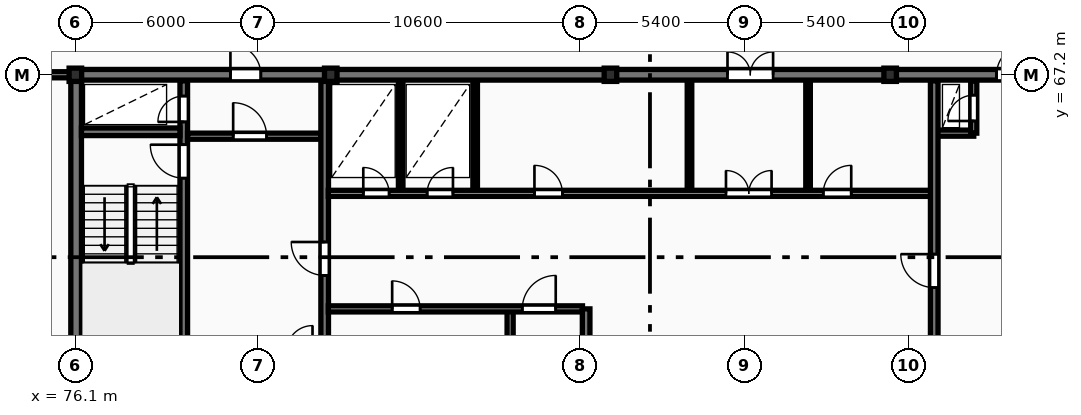
"""IFC4 building model, lengths in metres.
Left out: names, types, materials, properties, quantities, classifications, styles, units other than length and angle.
Written with IfcOpenShell. Run it as: python <this file> out.ifc"""

import sys

from ifc_helpers import new_model, si_unit, direction, frame, frame_2d, origin, origin_2d, place, context, subcontext, project, spatial, rectangle, i_section, extrude, element, fill, save


model = new_model("IFC4")
c1 = context("Model", 3, precision=1e-05, world=origin(), true_north=direction((0.0, 1.0)))
c2 = subcontext(c1, "Body", "Model", "MODEL_VIEW")
j1 = project(units=[si_unit("LENGTHUNIT", "METRE"), si_unit("PLANEANGLEUNIT", "RADIAN")], contexts=[c1])
p1 = place(None, origin())
s1 = spatial("IfcSite", under=j1, at=p1, CompositionType="ELEMENT")
p2 = place(p1, origin())
s2 = spatial("IfcBuilding", under=s1, at=p2, CompositionType="ELEMENT")
p3 = place(p2, frame((0.0, 0.0, 146.5)))
s3 = spatial("IfcBuildingStorey", under=s2, at=p3, CompositionType="ELEMENT", Elevation=146.5)
for number, where, z_axis, x_axis in (
    (1, (76.1, 67.2, 0.0), (0.0, 0.0, 1.0), (1.0, 0.0, 0.0)),
    (2, (84.5, 67.2, 0.0), (0.0, 0.0, 1.0), (1.0, 0.0, 0.0)),
    (3, (93.7, 67.2, 0.0), (0.0, 0.0, 1.0), (1.0, 0.0, 0.0)),
    (4, (102.9, 67.2, 0.0), (0.0, 0.0, 1.0), (1.0, 0.0, 0.0)),
):
    element("IfcColumn", number, at=place(p3, frame(where, z_axis=z_axis, x_axis=x_axis)), inside=s3, PredefinedType="COLUMN", context=c2, shape_type="SweptSolid", body=[
        extrude(i_section(OverallWidth=0.412, OverallDepth=0.437, WebThickness=0.036, FlangeThickness=0.052, FilletRadius=0.015, at=origin_2d()), origin(), (0.0, 0.0, 1.0), 3.6),
    ])
p4 = place(p3, frame((76.125, 55.375, 0.0), z_axis=(0.0, 0.0, 1.0), x_axis=(0.0, 1.0, 0.0)))
e5 = element("IfcWall", 5, at=p4, inside=s3, PredefinedType="SHEAR", context=c2, shape_type="SweptSolid", body=[
    extrude(rectangle(XDim=11.65, YDim=0.35, at=frame_2d((5.825, 0.0))), origin(), (0.0, 0.0, 1.0), 3.6),
])
p5 = place(p3, frame((75.95, 67.2, 0.0), z_axis=(0.0, 0.0, 1.0), x_axis=(1.0, 0.0, 0.0)))
e6 = element("IfcWall", 6, at=p5, inside=s3, PredefinedType="SHEAR", context=c2, shape_type="SweptSolid", body=[
    extrude(rectangle(XDim=36.3, YDim=0.35, at=frame_2d((18.15, 0.0))), origin(), (0.0, 0.0, 1.0), 3.6),
])
p6 = place(p5, frame((5.25, 0.0, 0.0)))
e7 = element("IfcOpeningElement", 7, at=p6, cuts=e6, PredefinedType="OPENING", context=c2, shape_type="SweptSolid", body=[
    extrude(rectangle(XDim=1.0, YDim=2.15, at=frame_2d((0.5, 1.075))), frame((0.0, 0.185, 0.0), z_axis=(0.0, -1.0, 0.0), x_axis=(1.0, 0.0, 0.0)), (0.0, 0.0, 1.0), 0.37),
])
p7 = place(p5, frame((21.6, 0.0, 0.0)))
e8 = element("IfcOpeningElement", 8, at=p7, cuts=e6, PredefinedType="OPENING", context=c2, shape_type="SweptSolid", body=[
    extrude(rectangle(XDim=1.5, YDim=2.2, at=frame_2d((0.75, 1.1))), frame((0.0, 0.185, 0.0), z_axis=(0.0, -1.0, 0.0), x_axis=(1.0, 0.0, 0.0)), (0.0, 0.0, 1.0), 0.37),
])
p8 = place(p5, frame((30.45, 0.0, 0.0)))
e9 = element("IfcOpeningElement", 9, at=p8, cuts=e6, PredefinedType="OPENING", context=c2, shape_type="SweptSolid", body=[
    extrude(rectangle(XDim=1.0, YDim=2.15, at=frame_2d((0.5, 1.075))), frame((0.0, 0.185, 0.0), z_axis=(0.0, -1.0, 0.0), x_axis=(1.0, 0.0, 0.0)), (0.0, 0.0, 1.0), 0.37),
])
p9 = place(p3, frame((79.665, 55.4, 0.0), z_axis=(0.0, 0.0, 1.0), x_axis=(0.0, 1.0, 0.0)))
e10 = element("IfcWall", 10, at=p9, inside=s3, PredefinedType="SHEAR", context=c2, shape_type="SweptSolid", body=[
    extrude(rectangle(XDim=11.6, YDim=0.25, at=frame_2d((5.8, 0.0))), origin(), (0.0, 0.0, 1.0), 3.6),
])
p10 = place(p9, frame((0.55, 0.0, 0.0)))
e11 = element("IfcOpeningElement", 11, at=p10, cuts=e10, PredefinedType="OPENING", context=c2, shape_type="SweptSolid", body=[
    extrude(rectangle(XDim=0.85, YDim=2.05, at=frame_2d((0.425, 1.025))), frame((0.0, 0.135, 0.0), z_axis=(0.0, -1.0, 0.0), x_axis=(1.0, 0.0, 0.0)), (0.0, 0.0, 1.0), 0.27),
])
p11 = place(p9, frame((8.4, 0.0, 0.0)))
e12 = element("IfcOpeningElement", 12, at=p11, cuts=e10, PredefinedType="OPENING", context=c2, shape_type="SweptSolid", body=[
    extrude(rectangle(XDim=1.1, YDim=2.1, at=frame_2d((0.55, 1.05))), frame((0.0, 0.135, 0.0), z_axis=(0.0, -1.0, 0.0), x_axis=(1.0, 0.0, 0.0)), (0.0, 0.0, 1.0), 0.27),
])
p12 = place(p9, frame((10.25, 0.0, 0.0)))
e13 = element("IfcOpeningElement", 13, at=p12, cuts=e10, PredefinedType="OPENING", context=c2, shape_type="SweptSolid", body=[
    extrude(rectangle(XDim=0.85, YDim=2.05, at=frame_2d((0.425, 1.025))), frame((0.0, 0.135, 0.0), z_axis=(0.0, -1.0, 0.0), x_axis=(1.0, 0.0, 0.0)), (0.0, 0.0, 1.0), 0.27),
])
p13 = place(p3, frame((76.3, 65.325, 0.0), z_axis=(0.0, 0.0, 1.0), x_axis=(1.0, 0.0, 0.0)))
e14 = element("IfcWall", 14, at=p13, inside=s3, PredefinedType="SHEAR", context=c2, shape_type="SweptSolid", body=[
    extrude(rectangle(XDim=3.24, YDim=0.25, at=frame_2d((1.62, 0.0))), origin(), (0.0, 0.0, 1.0), 3.6),
])
p14 = place(p3, frame((79.79, 65.18, 0.0), z_axis=(0.0, 0.0, 1.0), x_axis=(1.0, 0.0, 0.0)))
e15 = element("IfcWall", 15, at=p14, inside=s3, PredefinedType="PARTITIONING", context=c2, shape_type="SweptSolid", body=[
    extrude(rectangle(XDim=4.39, YDim=0.2, at=frame_2d((2.195, 0.0))), origin(), (0.0, 0.0, 1.0), 3.31),
])
p15 = place(p14, frame((1.5, 0.0, 0.0)))
e16 = element("IfcOpeningElement", 16, at=p15, cuts=e15, PredefinedType="OPENING", context=c2, shape_type="SweptSolid", body=[
    extrude(rectangle(XDim=1.1, YDim=2.1, at=frame_2d((0.55, 1.05))), frame((0.0, 0.11, 0.0), z_axis=(0.0, -1.0, 0.0), x_axis=(1.0, 0.0, 0.0)), (0.0, 0.0, 1.0), 0.22),
])
p16 = place(p3, frame((84.3, 55.4, 0.0), z_axis=(0.0, 0.0, 1.0), x_axis=(0.0, 1.0, 0.0)))
e17 = element("IfcWall", 17, at=p16, inside=s3, PredefinedType="SHEAR", context=c2, shape_type="SweptSolid", body=[
    extrude(rectangle(XDim=11.6, YDim=0.25, at=frame_2d((5.8, 0.0))), origin(), (0.0, 0.0, 1.0), 3.6),
])
p17 = place(p16, frame((5.2, 0.0, 0.0)))
e18 = element("IfcOpeningElement", 18, at=p17, cuts=e17, PredefinedType="OPENING", context=c2, shape_type="SweptSolid", body=[
    extrude(rectangle(XDim=1.1, YDim=2.1, at=frame_2d((0.55, 1.05))), frame((0.0, 0.135, 0.0), z_axis=(0.0, -1.0, 0.0), x_axis=(1.0, 0.0, 0.0)), (0.0, 0.0, 1.0), 0.27),
])
p18 = place(p3, frame((90.4, 55.4, 0.0), z_axis=(0.0, 0.0, 1.0), x_axis=(0.0, 1.0, 0.0)))
e19 = element("IfcWall", 19, at=p18, inside=s3, PredefinedType="PARTITIONING", context=c2, shape_type="SweptSolid", body=[
    extrude(rectangle(XDim=4.1, YDim=0.2, at=frame_2d((2.05, 0.0))), origin(), (0.0, 0.0, 1.0), 3.31),
])
p19 = place(p3, frame((84.42, 59.5, 0.0), z_axis=(0.0, 0.0, 1.0), x_axis=(1.0, 0.0, 0.0)))
e20 = element("IfcWall", 20, at=p19, inside=s3, PredefinedType="PARTITIONING", context=c2, shape_type="SweptSolid", body=[
    extrude(rectangle(XDim=8.36, YDim=0.2, at=frame_2d((4.18, 0.0))), origin(), (0.0, 0.0, 1.0), 3.31),
])
p20 = place(p19, frame((2.1, 0.0, 0.0)))
e21 = element("IfcOpeningElement", 21, at=p20, cuts=e20, PredefinedType="OPENING", context=c2, shape_type="SweptSolid", body=[
    extrude(rectangle(XDim=0.92, YDim=2.08, at=frame_2d((0.46, 1.04))), frame((0.0, 0.11, 0.0), z_axis=(0.0, -1.0, 0.0), x_axis=(1.0, 0.0, 0.0)), (0.0, 0.0, 1.0), 0.22),
])
p21 = place(p19, frame((6.38, 0.0, 0.0)))
e22 = element("IfcOpeningElement", 22, at=p21, cuts=e20, PredefinedType="OPENING", context=c2, shape_type="SweptSolid", body=[
    extrude(rectangle(XDim=1.1, YDim=2.1, at=frame_2d((0.55, 1.05))), frame((0.0, 0.11, 0.0), z_axis=(0.0, -1.0, 0.0), x_axis=(1.0, 0.0, 0.0)), (0.0, 0.0, 1.0), 0.22),
])
p22 = place(p3, frame((92.9, 55.4, 0.0), z_axis=(0.0, 0.0, 1.0), x_axis=(0.0, 1.0, 0.0)))
e23 = element("IfcWall", 23, at=p22, inside=s3, PredefinedType="SHEAR", context=c2, shape_type="SweptSolid", body=[
    extrude(rectangle(XDim=4.1, YDim=0.25, at=frame_2d((2.05, 0.0))), origin(), (0.0, 0.0, 1.0), 3.6),
])
for number, where, z_axis, x_axis in (
    (24, (86.8, 63.4, 0.0), (0.0, 0.0, 1.0), (0.0, 1.0, 0.0)),
    (25, (89.25, 63.4, 0.0), (0.0, 0.0, 1.0), (0.0, 1.0, 0.0)),
    (26, (96.3, 63.4, 0.0), (0.0, 0.0, 1.0), (0.0, 1.0, 0.0)),
    (27, (100.2, 63.4, 0.0), (0.0, 0.0, 1.0), (0.0, 1.0, 0.0)),
):
    element("IfcWall", number, at=place(p3, frame(where, z_axis=z_axis, x_axis=x_axis)), inside=s3, PredefinedType="PARTITIONING", context=c2, shape_type="SweptSolid", body=[
        extrude(rectangle(XDim=3.6, YDim=0.15, at=frame_2d((1.8, 0.0))), origin(), (0.0, 0.0, 1.0), 3.31),
    ])
p23 = place(p3, frame((84.42, 63.3, 0.0), z_axis=(0.0, 0.0, 1.0), x_axis=(1.0, 0.0, 0.0)))
e28 = element("IfcWall", 28, at=p23, inside=s3, PredefinedType="PARTITIONING", context=c2, shape_type="SweptSolid", body=[
    extrude(rectangle(XDim=19.83, YDim=0.2, at=frame_2d((9.915, 0.0))), origin(), (0.0, 0.0, 1.0), 3.31),
])
p24 = place(p23, frame((1.15, 0.0, 0.0)))
e29 = element("IfcOpeningElement", 29, at=p24, cuts=e28, PredefinedType="OPENING", context=c2, shape_type="SweptSolid", body=[
    extrude(rectangle(XDim=0.85, YDim=2.05, at=frame_2d((0.425, 1.025))), frame((0.0, 0.11, 0.0), z_axis=(0.0, -1.0, 0.0), x_axis=(1.0, 0.0, 0.0)), (0.0, 0.0, 1.0), 0.22),
])
p25 = place(p23, frame((3.25, 0.0, 0.0)))
e30 = element("IfcOpeningElement", 30, at=p25, cuts=e28, PredefinedType="OPENING", context=c2, shape_type="SweptSolid", body=[
    extrude(rectangle(XDim=0.85, YDim=2.05, at=frame_2d((0.425, 1.025))), frame((0.0, 0.11, 0.0), z_axis=(0.0, -1.0, 0.0), x_axis=(1.0, 0.0, 0.0)), (0.0, 0.0, 1.0), 0.22),
])
p26 = place(p23, frame((13.08, 0.0, 0.0)))
e31 = element("IfcOpeningElement", 31, at=p26, cuts=e28, PredefinedType="OPENING", context=c2, shape_type="SweptSolid", body=[
    extrude(rectangle(XDim=1.5, YDim=2.2, at=frame_2d((0.75, 1.1))), frame((0.0, 0.11, 0.0), z_axis=(0.0, -1.0, 0.0), x_axis=(1.0, 0.0, 0.0)), (0.0, 0.0, 1.0), 0.22),
])
p27 = place(p23, frame((6.78, 0.0, 0.0)))
e32 = element("IfcOpeningElement", 32, at=p27, cuts=e28, PredefinedType="OPENING", context=c2, shape_type="SweptSolid", body=[
    extrude(rectangle(XDim=0.92, YDim=2.08, at=frame_2d((0.46, 1.04))), frame((0.0, 0.11, 0.0), z_axis=(0.0, -1.0, 0.0), x_axis=(1.0, 0.0, 0.0)), (0.0, 0.0, 1.0), 0.22),
])
p28 = place(p23, frame((16.28, 0.0, 0.0)))
e33 = element("IfcOpeningElement", 33, at=p28, cuts=e28, PredefinedType="OPENING", context=c2, shape_type="SweptSolid", body=[
    extrude(rectangle(XDim=0.92, YDim=2.08, at=frame_2d((0.46, 1.04))), frame((0.0, 0.11, 0.0), z_axis=(0.0, -1.0, 0.0), x_axis=(1.0, 0.0, 0.0)), (0.0, 0.0, 1.0), 0.22),
])
p29 = place(p3, frame((104.45, 65.28, 0.0), z_axis=(0.0, 0.0, 1.0), x_axis=(1.0, 0.0, 0.0)))
e34 = element("IfcWall", 34, at=p29, inside=s3, PredefinedType="PARTITIONING", context=c2, shape_type="SweptSolid", body=[
    extrude(rectangle(XDim=1.2, YDim=0.2, at=frame_2d((0.6, 0.0))), origin(), (0.0, 0.0, 1.0), 3.31),
])
p30 = place(p3, frame((105.65, 65.28, 0.0), z_axis=(0.0, 0.0, 1.0), x_axis=(0.0, 1.0, 0.0)))
e35 = element("IfcWall", 35, at=p30, inside=s3, PredefinedType="PARTITIONING", context=c2, shape_type="SweptSolid", body=[
    extrude(rectangle(XDim=1.72, YDim=0.2, at=frame_2d((0.86, 0.0))), origin(), (0.0, 0.0, 1.0), 3.31),
])
p31 = place(p30, frame((0.4, 0.0, 0.0)))
e36 = element("IfcOpeningElement", 36, at=p31, cuts=e35, PredefinedType="OPENING", context=c2, shape_type="SweptSolid", body=[
    extrude(rectangle(XDim=0.85, YDim=2.05, at=frame_2d((0.425, 1.025))), frame((0.0, 0.11, 0.0), z_axis=(0.0, -1.0, 0.0), x_axis=(1.0, 0.0, 0.0)), (0.0, 0.0, 1.0), 0.22),
])
p32 = place(p3, frame((104.35, 58.4, 0.0), z_axis=(0.0, 0.0, 1.0), x_axis=(0.0, 1.0, 0.0)))
e37 = element("IfcWall", 37, at=p32, inside=s3, PredefinedType="SHEAR", context=c2, shape_type="SweptSolid", body=[
    extrude(rectangle(XDim=8.6, YDim=0.25, at=frame_2d((4.3, 0.0))), origin(), (0.0, 0.0, 1.0), 3.6),
])
p33 = place(p32, frame((1.8, 0.0, 0.0)))
e38 = element("IfcOpeningElement", 38, at=p33, cuts=e37, PredefinedType="OPENING", context=c2, shape_type="SweptSolid", body=[
    extrude(rectangle(XDim=1.1, YDim=2.1, at=frame_2d((0.55, 1.05))), frame((0.0, 0.135, 0.0), z_axis=(0.0, -1.0, 0.0), x_axis=(1.0, 0.0, 0.0)), (0.0, 0.0, 1.0), 0.27),
])
p34 = place(p3, frame((57.6, 67.2, 0.0), z_axis=(0.0, 0.0, 1.0), x_axis=(1.0, 0.0, 0.0)))
e39 = element("IfcWall", 39, at=p34, inside=s3, PredefinedType="PARTITIONING", context=c2, shape_type="SweptSolid", body=[
    extrude(rectangle(XDim=18.35, YDim=0.2, at=frame_2d((9.175, 0.0))), origin(), (0.0, 0.0, 1.0), 2.773),
])
p35 = place(p34, frame((11.87, 0.0, 0.0)))
e40 = element("IfcOpeningElement", 40, at=p35, cuts=e39, PredefinedType="OPENING", context=c2, shape_type="SweptSolid", body=[
    extrude(rectangle(XDim=0.95, YDim=2.15, at=frame_2d((0.475, 1.075))), frame((0.0, 0.11, 0.0), z_axis=(0.0, -1.0, 0.0), x_axis=(1.0, 0.0, 0.0)), (0.0, 0.0, 1.0), 0.22),
])
p36 = place(p6, origin())
e41 = element("IfcDoor", 41, at=p36, inside=s3, OperationType="SINGLE_SWING_LEFT", PredefinedType="DOOR", context=c2, shape_type="SweptSolid", body=[
    extrude(rectangle(XDim=1.0, YDim=2.15, at=frame_2d((0.5, 1.075))), frame((0.0, 0.025, 0.0), z_axis=(0.0, -1.0, 0.0), x_axis=(1.0, 0.0, 0.0)), (0.0, 0.0, 1.0), 0.05),
])
fill(e7, e41)
p37 = place(p7, origin())
e42 = element("IfcDoor", 42, at=p37, inside=s3, OperationType="DOUBLE_DOOR_SINGLE_SWING", PredefinedType="DOOR", context=c2, shape_type="SweptSolid", body=[
    extrude(rectangle(XDim=1.5, YDim=2.2, at=frame_2d((0.75, 1.1))), frame((0.0, 0.025, 0.0), z_axis=(0.0, -1.0, 0.0), x_axis=(1.0, 0.0, 0.0)), (0.0, 0.0, 1.0), 0.05),
])
fill(e8, e42)
p38 = place(p8, origin())
e43 = element("IfcDoor", 43, at=p38, inside=s3, OperationType="SINGLE_SWING_RIGHT", PredefinedType="DOOR", context=c2, shape_type="SweptSolid", body=[
    extrude(rectangle(XDim=1.0, YDim=2.15, at=frame_2d((0.5, 1.075))), frame((0.0, 0.025, 0.0), z_axis=(0.0, -1.0, 0.0), x_axis=(1.0, 0.0, 0.0)), (0.0, 0.0, 1.0), 0.05),
])
fill(e9, e43)
p39 = place(p11, origin())
e44 = element("IfcDoor", 44, at=p39, inside=s3, OperationType="SINGLE_SWING_RIGHT", PredefinedType="DOOR", context=c2, shape_type="SweptSolid", body=[
    extrude(rectangle(XDim=1.1, YDim=2.1, at=frame_2d((0.55, 1.05))), frame((0.0, 0.025, 0.0), z_axis=(0.0, -1.0, 0.0), x_axis=(1.0, 0.0, 0.0)), (0.0, 0.0, 1.0), 0.05),
])
fill(e12, e44)
p40 = place(p12, origin())
e45 = element("IfcDoor", 45, at=p40, inside=s3, OperationType="SINGLE_SWING_LEFT", PredefinedType="DOOR", context=c2, shape_type="SweptSolid", body=[
    extrude(rectangle(XDim=0.85, YDim=2.05, at=frame_2d((0.425, 1.025))), frame((0.0, 0.025, 0.0), z_axis=(0.0, -1.0, 0.0), x_axis=(1.0, 0.0, 0.0)), (0.0, 0.0, 1.0), 0.05),
])
fill(e13, e45)
p41 = place(p15, origin())
e46 = element("IfcDoor", 46, at=p41, inside=s3, OperationType="SINGLE_SWING_LEFT", PredefinedType="DOOR", context=c2, shape_type="SweptSolid", body=[
    extrude(rectangle(XDim=1.1, YDim=2.1, at=frame_2d((0.55, 1.05))), frame((0.0, 0.025, 0.0), z_axis=(0.0, -1.0, 0.0), x_axis=(1.0, 0.0, 0.0)), (0.0, 0.0, 1.0), 0.05),
])
fill(e16, e46)
p42 = place(p17, origin())
e47 = element("IfcDoor", 47, at=p42, inside=s3, OperationType="SINGLE_SWING_RIGHT", PredefinedType="DOOR", context=c2, shape_type="SweptSolid", body=[
    extrude(rectangle(XDim=1.1, YDim=2.1, at=frame_2d((0.55, 1.05))), frame((0.0, 0.025, 0.0), z_axis=(0.0, -1.0, 0.0), x_axis=(1.0, 0.0, 0.0)), (0.0, 0.0, 1.0), 0.05),
])
fill(e18, e47)
p43 = place(p20, origin())
e48 = element("IfcDoor", 48, at=p43, inside=s3, OperationType="SINGLE_SWING_LEFT", PredefinedType="DOOR", context=c2, shape_type="SweptSolid", body=[
    extrude(rectangle(XDim=0.92, YDim=2.08, at=frame_2d((0.46, 1.04))), frame((0.0, 0.025, 0.0), z_axis=(0.0, -1.0, 0.0), x_axis=(1.0, 0.0, 0.0)), (0.0, 0.0, 1.0), 0.05),
])
fill(e21, e48)
p44 = place(p21, origin())
e49 = element("IfcDoor", 49, at=p44, inside=s3, OperationType="SINGLE_SWING_RIGHT", PredefinedType="DOOR", context=c2, shape_type="SweptSolid", body=[
    extrude(rectangle(XDim=1.1, YDim=2.1, at=frame_2d((0.55, 1.05))), frame((0.0, 0.025, 0.0), z_axis=(0.0, -1.0, 0.0), x_axis=(1.0, 0.0, 0.0)), (0.0, 0.0, 1.0), 0.05),
])
fill(e22, e49)
p45 = place(p24, origin())
e50 = element("IfcDoor", 50, at=p45, inside=s3, OperationType="SINGLE_SWING_LEFT", PredefinedType="DOOR", context=c2, shape_type="SweptSolid", body=[
    extrude(rectangle(XDim=0.85, YDim=2.05, at=frame_2d((0.425, 1.025))), frame((0.0, 0.025, 0.0), z_axis=(0.0, -1.0, 0.0), x_axis=(1.0, 0.0, 0.0)), (0.0, 0.0, 1.0), 0.05),
])
fill(e29, e50)
p46 = place(p25, origin())
e51 = element("IfcDoor", 51, at=p46, inside=s3, OperationType="SINGLE_SWING_RIGHT", PredefinedType="DOOR", context=c2, shape_type="SweptSolid", body=[
    extrude(rectangle(XDim=0.85, YDim=2.05, at=frame_2d((0.425, 1.025))), frame((0.0, 0.025, 0.0), z_axis=(0.0, -1.0, 0.0), x_axis=(1.0, 0.0, 0.0)), (0.0, 0.0, 1.0), 0.05),
])
fill(e30, e51)
p47 = place(p26, origin())
e52 = element("IfcDoor", 52, at=p47, inside=s3, OperationType="DOUBLE_DOOR_SINGLE_SWING", PredefinedType="DOOR", context=c2, shape_type="SweptSolid", body=[
    extrude(rectangle(XDim=1.5, YDim=2.2, at=frame_2d((0.75, 1.1))), frame((0.0, 0.025, 0.0), z_axis=(0.0, -1.0, 0.0), x_axis=(1.0, 0.0, 0.0)), (0.0, 0.0, 1.0), 0.05),
])
fill(e31, e52)
p48 = place(p27, origin())
e53 = element("IfcDoor", 53, at=p48, inside=s3, OperationType="SINGLE_SWING_LEFT", PredefinedType="DOOR", context=c2, shape_type="SweptSolid", body=[
    extrude(rectangle(XDim=0.92, YDim=2.08, at=frame_2d((0.46, 1.04))), frame((0.0, 0.025, 0.0), z_axis=(0.0, -1.0, 0.0), x_axis=(1.0, 0.0, 0.0)), (0.0, 0.0, 1.0), 0.05),
])
fill(e32, e53)
p49 = place(p28, origin())
e54 = element("IfcDoor", 54, at=p49, inside=s3, OperationType="SINGLE_SWING_RIGHT", PredefinedType="DOOR", context=c2, shape_type="SweptSolid", body=[
    extrude(rectangle(XDim=0.92, YDim=2.08, at=frame_2d((0.46, 1.04))), frame((0.0, 0.025, 0.0), z_axis=(0.0, -1.0, 0.0), x_axis=(1.0, 0.0, 0.0)), (0.0, 0.0, 1.0), 0.05),
])
fill(e33, e54)
p50 = place(p31, origin())
e55 = element("IfcDoor", 55, at=p50, inside=s3, OperationType="SINGLE_SWING_LEFT", PredefinedType="DOOR", context=c2, shape_type="SweptSolid", body=[
    extrude(rectangle(XDim=0.85, YDim=2.05, at=frame_2d((0.425, 1.025))), frame((0.0, 0.025, 0.0), z_axis=(0.0, -1.0, 0.0), x_axis=(1.0, 0.0, 0.0)), (0.0, 0.0, 1.0), 0.05),
])
fill(e36, e55)
p51 = place(p33, origin())
e56 = element("IfcDoor", 56, at=p51, inside=s3, OperationType="SINGLE_SWING_RIGHT", PredefinedType="DOOR", context=c2, shape_type="SweptSolid", body=[
    extrude(rectangle(XDim=1.1, YDim=2.1, at=frame_2d((0.55, 1.05))), frame((0.0, 0.025, 0.0), z_axis=(0.0, -1.0, 0.0), x_axis=(1.0, 0.0, 0.0)), (0.0, 0.0, 1.0), 0.05),
])
fill(e38, e56)
save(model, sys.argv[1])
